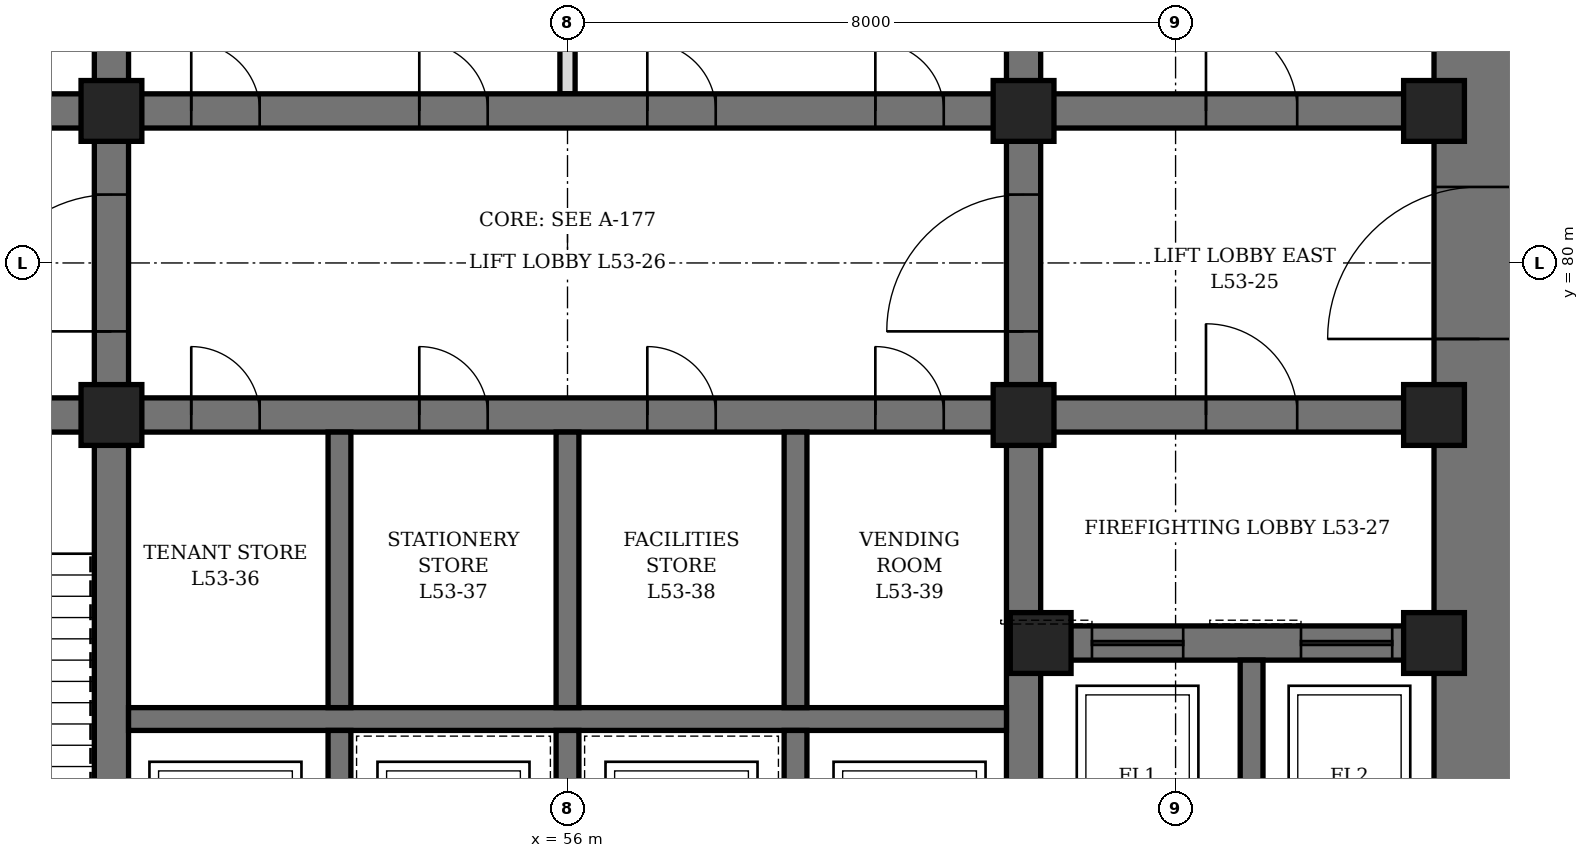
"""IFC4 building model, lengths in metres.
Left out: names, types, materials, properties, quantities, classifications, styles, units other than length and angle.
Written with IfcOpenShell. Run it as: python <this file> out.ifc"""

import sys

from ifc_helpers import new_model, si_unit, direction, frame, frame_2d, origin, origin_2d, place, context, subcontext, project, spatial, rectangle, hollow_rectangle, extrude, element, fill, save


model = new_model("IFC4")
c1 = context("Model", 3, precision=1e-05, world=origin(), true_north=direction((0.0, 1.0)))
c2 = subcontext(c1, "Body", "Model", "MODEL_VIEW")
j1 = project(units=[si_unit("LENGTHUNIT", "METRE"), si_unit("PLANEANGLEUNIT", "RADIAN")], contexts=[c1])
p1 = place(None, origin())
s1 = spatial("IfcSite", under=j1, at=p1, CompositionType="ELEMENT")
p2 = place(p1, origin())
s2 = spatial("IfcBuilding", under=s1, at=p2, CompositionType="ELEMENT")
p3 = place(p2, frame((0.0, 0.0, 235.9)))
s3 = spatial("IfcBuildingStorey", under=s2, at=p3, CompositionType="ELEMENT", Elevation=235.9)
p4 = place(p3, frame((68.0, 70.4, 0.0), z_axis=(0.0, 0.0, 1.0), x_axis=(0.0, 1.0, 0.0)))
e1 = element("IfcWall", 1, at=p4, inside=s3, PredefinedType="SHEAR", context=c2, shape_type="SweptSolid", body=[
    extrude(rectangle(XDim=19.2, YDim=1.2, at=frame_2d((9.6, 0.0))), origin(), (0.0, 0.0, 1.0), 4.2),
])
p5 = place(p4, frame((8.6, 0.0, 0.0)))
e2 = element("IfcOpeningElement", 2, at=p5, cuts=e1, PredefinedType="OPENING", context=c2, shape_type="SweptSolid", body=[
    extrude(rectangle(XDim=2.0, YDim=2.4, at=frame_2d((1.0, 1.2))), frame((0.0, 0.61, 0.0), z_axis=(0.0, -1.0, 0.0), x_axis=(1.0, 0.0, 0.0)), (0.0, 0.0, 1.0), 1.22),
])
p6 = place(p3, frame((50.0, 71.6, 0.0), z_axis=(0.0, 0.0, 1.0), x_axis=(0.0, 1.0, 0.0)))
e3 = element("IfcWall", 3, at=p6, inside=s3, PredefinedType="SHEAR", context=c2, shape_type="SweptSolid", body=[
    extrude(rectangle(XDim=16.8, YDim=0.45, at=frame_2d((8.4, 0.0))), origin(), (0.0, 0.0, 1.0), 4.2),
])
p7 = place(p6, frame((7.5, 0.0, 0.0)))
e4 = element("IfcOpeningElement", 4, at=p7, cuts=e3, PredefinedType="OPENING", context=c2, shape_type="SweptSolid", body=[
    extrude(rectangle(XDim=1.8, YDim=2.4, at=frame_2d((0.9, 1.2))), frame((0.0, 0.235, 0.0), z_axis=(0.0, -1.0, 0.0), x_axis=(1.0, 0.0, 0.0)), (0.0, 0.0, 1.0), 0.47),
])
p8 = place(p3, frame((62.0, 71.6, 0.0), z_axis=(0.0, 0.0, 1.0), x_axis=(0.0, 1.0, 0.0)))
e5 = element("IfcWall", 5, at=p8, inside=s3, PredefinedType="SHEAR", context=c2, shape_type="SweptSolid", body=[
    extrude(rectangle(XDim=16.8, YDim=0.45, at=frame_2d((8.4, 0.0))), origin(), (0.0, 0.0, 1.0), 4.2),
])
p9 = place(p8, frame((7.5, 0.0, 0.0)))
e6 = element("IfcOpeningElement", 6, at=p9, cuts=e5, PredefinedType="OPENING", context=c2, shape_type="SweptSolid", body=[
    extrude(rectangle(XDim=1.8, YDim=2.4, at=frame_2d((0.9, 1.2))), frame((0.0, 0.235, 0.0), z_axis=(0.0, -1.0, 0.0), x_axis=(1.0, 0.0, 0.0)), (0.0, 0.0, 1.0), 0.47),
])
p10 = place(p3, frame((44.6, 78.0, 0.0), z_axis=(0.0, 0.0, 1.0), x_axis=(1.0, 0.0, 0.0)))
e7 = element("IfcWall", 7, at=p10, inside=s3, PredefinedType="SHEAR", context=c2, shape_type="SweptSolid", body=[
    extrude(rectangle(XDim=5.175, YDim=0.45, at=frame_2d((2.587, 0.0))), origin(), (0.0, 0.0, 1.0), 4.2),
])
p11 = place(p10, frame((1.8, 0.0, 0.0)))
e8 = element("IfcOpeningElement", 8, at=p11, cuts=e7, PredefinedType="OPENING", context=c2, shape_type="SweptSolid", body=[
    extrude(rectangle(XDim=1.2, YDim=2.1, at=frame_2d((0.6, 1.05))), frame((0.0, 0.235, 0.0), z_axis=(0.0, -1.0, 0.0), x_axis=(1.0, 0.0, 0.0)), (0.0, 0.0, 1.0), 0.47),
])
p12 = place(p3, frame((44.6, 82.0, 0.0), z_axis=(0.0, 0.0, 1.0), x_axis=(1.0, 0.0, 0.0)))
e9 = element("IfcWall", 9, at=p12, inside=s3, PredefinedType="SHEAR", context=c2, shape_type="SweptSolid", body=[
    extrude(rectangle(XDim=5.175, YDim=0.45, at=frame_2d((2.587, 0.0))), origin(), (0.0, 0.0, 1.0), 4.2),
])
p13 = place(p12, frame((0.7, 0.0, 0.0)))
e10 = element("IfcOpeningElement", 10, at=p13, cuts=e9, PredefinedType="OPENING", context=c2, shape_type="SweptSolid", body=[
    extrude(rectangle(XDim=0.9, YDim=2.1, at=frame_2d((0.45, 1.05))), frame((0.0, 0.235, 0.0), z_axis=(0.0, -1.0, 0.0), x_axis=(1.0, 0.0, 0.0)), (0.0, 0.0, 1.0), 0.47),
])
p14 = place(p3, frame((62.225, 75.0, 0.0), z_axis=(0.0, 0.0, 1.0), x_axis=(1.0, 0.0, 0.0)))
e11 = element("IfcWall", 11, at=p14, inside=s3, PredefinedType="SHEAR", context=c2, shape_type="SweptSolid", body=[
    extrude(rectangle(XDim=5.175, YDim=0.45, at=frame_2d((2.587, 0.0))), origin(), (0.0, 0.0, 1.0), 4.2),
])
p15 = place(p14, frame((0.675, 0.0, 0.0)))
e12 = element("IfcOpeningElement", 12, at=p15, cuts=e11, PredefinedType="OPENING", context=c2, shape_type="SweptSolid", body=[
    extrude(rectangle(XDim=1.2, YDim=2.2, at=frame_2d((0.6, 1.1))), frame((0.0, 0.235, 0.0), z_axis=(0.0, -1.0, 0.0), x_axis=(1.0, 0.0, 0.0)), (0.0, 0.0, 1.0), 0.47),
])
p16 = place(p14, frame((3.425, 0.0, 0.0)))
e13 = element("IfcOpeningElement", 13, at=p16, cuts=e11, PredefinedType="OPENING", context=c2, shape_type="SweptSolid", body=[
    extrude(rectangle(XDim=1.2, YDim=2.2, at=frame_2d((0.6, 1.1))), frame((0.0, 0.235, 0.0), z_axis=(0.0, -1.0, 0.0), x_axis=(1.0, 0.0, 0.0)), (0.0, 0.0, 1.0), 0.47),
])
p17 = place(p3, frame((62.225, 78.0, 0.0), z_axis=(0.0, 0.0, 1.0), x_axis=(1.0, 0.0, 0.0)))
e14 = element("IfcWall", 14, at=p17, inside=s3, PredefinedType="SHEAR", context=c2, shape_type="SweptSolid", body=[
    extrude(rectangle(XDim=5.175, YDim=0.45, at=frame_2d((2.587, 0.0))), origin(), (0.0, 0.0, 1.0), 4.2),
])
p18 = place(p17, frame((2.175, 0.0, 0.0)))
e15 = element("IfcOpeningElement", 15, at=p18, cuts=e14, PredefinedType="OPENING", context=c2, shape_type="SweptSolid", body=[
    extrude(rectangle(XDim=1.2, YDim=2.1, at=frame_2d((0.6, 1.05))), frame((0.0, 0.235, 0.0), z_axis=(0.0, -1.0, 0.0), x_axis=(1.0, 0.0, 0.0)), (0.0, 0.0, 1.0), 0.47),
])
p19 = place(p3, frame((62.225, 82.0, 0.0), z_axis=(0.0, 0.0, 1.0), x_axis=(1.0, 0.0, 0.0)))
e16 = element("IfcWall", 16, at=p19, inside=s3, PredefinedType="SHEAR", context=c2, shape_type="SweptSolid", body=[
    extrude(rectangle(XDim=5.175, YDim=0.45, at=frame_2d((2.587, 0.0))), origin(), (0.0, 0.0, 1.0), 4.2),
])
p20 = place(p19, frame((2.175, 0.0, 0.0)))
e17 = element("IfcOpeningElement", 17, at=p20, cuts=e16, PredefinedType="OPENING", context=c2, shape_type="SweptSolid", body=[
    extrude(rectangle(XDim=1.2, YDim=2.1, at=frame_2d((0.6, 1.05))), frame((0.0, 0.235, 0.0), z_axis=(0.0, -1.0, 0.0), x_axis=(1.0, 0.0, 0.0)), (0.0, 0.0, 1.0), 0.47),
])
p21 = place(p3, frame((50.225, 78.0, 0.0), z_axis=(0.0, 0.0, 1.0), x_axis=(1.0, 0.0, 0.0)))
e18 = element("IfcWall", 18, at=p21, inside=s3, PredefinedType="SHEAR", context=c2, shape_type="SweptSolid", body=[
    extrude(rectangle(XDim=11.55, YDim=0.45, at=frame_2d((5.775, 0.0))), origin(), (0.0, 0.0, 1.0), 4.2),
])
p22 = place(p21, frame((0.825, 0.0, 0.0)))
e19 = element("IfcOpeningElement", 19, at=p22, cuts=e18, PredefinedType="OPENING", context=c2, shape_type="SweptSolid", body=[
    extrude(rectangle(XDim=0.9, YDim=2.1, at=frame_2d((0.45, 1.05))), frame((0.0, 0.235, 0.0), z_axis=(0.0, -1.0, 0.0), x_axis=(1.0, 0.0, 0.0)), (0.0, 0.0, 1.0), 0.47),
])
p23 = place(p21, frame((3.825, 0.0, 0.0)))
e20 = element("IfcOpeningElement", 20, at=p23, cuts=e18, PredefinedType="OPENING", context=c2, shape_type="SweptSolid", body=[
    extrude(rectangle(XDim=0.9, YDim=2.1, at=frame_2d((0.45, 1.05))), frame((0.0, 0.235, 0.0), z_axis=(0.0, -1.0, 0.0), x_axis=(1.0, 0.0, 0.0)), (0.0, 0.0, 1.0), 0.47),
])
p24 = place(p21, frame((6.825, 0.0, 0.0)))
e21 = element("IfcOpeningElement", 21, at=p24, cuts=e18, PredefinedType="OPENING", context=c2, shape_type="SweptSolid", body=[
    extrude(rectangle(XDim=0.9, YDim=2.1, at=frame_2d((0.45, 1.05))), frame((0.0, 0.235, 0.0), z_axis=(0.0, -1.0, 0.0), x_axis=(1.0, 0.0, 0.0)), (0.0, 0.0, 1.0), 0.47),
])
p25 = place(p21, frame((9.825, 0.0, 0.0)))
e22 = element("IfcOpeningElement", 22, at=p25, cuts=e18, PredefinedType="OPENING", context=c2, shape_type="SweptSolid", body=[
    extrude(rectangle(XDim=0.9, YDim=2.1, at=frame_2d((0.45, 1.05))), frame((0.0, 0.235, 0.0), z_axis=(0.0, -1.0, 0.0), x_axis=(1.0, 0.0, 0.0)), (0.0, 0.0, 1.0), 0.47),
])
p26 = place(p3, frame((50.225, 82.0, 0.0), z_axis=(0.0, 0.0, 1.0), x_axis=(1.0, 0.0, 0.0)))
e23 = element("IfcWall", 23, at=p26, inside=s3, PredefinedType="SHEAR", context=c2, shape_type="SweptSolid", body=[
    extrude(rectangle(XDim=11.55, YDim=0.45, at=frame_2d((5.775, 0.0))), origin(), (0.0, 0.0, 1.0), 4.2),
])
p27 = place(p26, frame((0.825, 0.0, 0.0)))
e24 = element("IfcOpeningElement", 24, at=p27, cuts=e23, PredefinedType="OPENING", context=c2, shape_type="SweptSolid", body=[
    extrude(rectangle(XDim=0.9, YDim=2.1, at=frame_2d((0.45, 1.05))), frame((0.0, 0.235, 0.0), z_axis=(0.0, -1.0, 0.0), x_axis=(1.0, 0.0, 0.0)), (0.0, 0.0, 1.0), 0.47),
])
p28 = place(p26, frame((3.825, 0.0, 0.0)))
e25 = element("IfcOpeningElement", 25, at=p28, cuts=e23, PredefinedType="OPENING", context=c2, shape_type="SweptSolid", body=[
    extrude(rectangle(XDim=0.9, YDim=2.1, at=frame_2d((0.45, 1.05))), frame((0.0, 0.235, 0.0), z_axis=(0.0, -1.0, 0.0), x_axis=(1.0, 0.0, 0.0)), (0.0, 0.0, 1.0), 0.47),
])
p29 = place(p26, frame((6.825, 0.0, 0.0)))
e26 = element("IfcOpeningElement", 26, at=p29, cuts=e23, PredefinedType="OPENING", context=c2, shape_type="SweptSolid", body=[
    extrude(rectangle(XDim=0.9, YDim=2.1, at=frame_2d((0.45, 1.05))), frame((0.0, 0.235, 0.0), z_axis=(0.0, -1.0, 0.0), x_axis=(1.0, 0.0, 0.0)), (0.0, 0.0, 1.0), 0.47),
])
p30 = place(p26, frame((9.825, 0.0, 0.0)))
e27 = element("IfcOpeningElement", 27, at=p30, cuts=e23, PredefinedType="OPENING", context=c2, shape_type="SweptSolid", body=[
    extrude(rectangle(XDim=0.9, YDim=2.1, at=frame_2d((0.45, 1.05))), frame((0.0, 0.235, 0.0), z_axis=(0.0, -1.0, 0.0), x_axis=(1.0, 0.0, 0.0)), (0.0, 0.0, 1.0), 0.47),
])
p31 = place(p3, frame((50.225, 74.0, 0.0), z_axis=(0.0, 0.0, 1.0), x_axis=(1.0, 0.0, 0.0)))
e28 = element("IfcWall", 28, at=p31, inside=s3, PredefinedType="SHEAR", context=c2, shape_type="SweptSolid", body=[
    extrude(rectangle(XDim=11.55, YDim=0.3, at=frame_2d((5.775, 0.0))), origin(), (0.0, 0.0, 1.0), 4.2),
])
p32 = place(p3, frame((53.0, 71.6, 0.0), z_axis=(0.0, 0.0, 1.0), x_axis=(0.0, 1.0, 0.0)))
e29 = element("IfcWall", 29, at=p32, inside=s3, PredefinedType="SHEAR", context=c2, shape_type="SweptSolid", body=[
    extrude(rectangle(XDim=2.25, YDim=0.3, at=frame_2d((1.125, 0.0))), origin(), (0.0, 0.0, 1.0), 4.2),
])
p33 = place(p3, frame((53.0, 74.15, 0.0), z_axis=(0.0, 0.0, 1.0), x_axis=(0.0, 1.0, 0.0)))
e30 = element("IfcWall", 30, at=p33, inside=s3, PredefinedType="SHEAR", context=c2, shape_type="SweptSolid", body=[
    extrude(rectangle(XDim=3.625, YDim=0.3, at=frame_2d((1.812, 0.0))), origin(), (0.0, 0.0, 1.0), 4.2),
])
p34 = place(p3, frame((56.0, 71.6, 0.0), z_axis=(0.0, 0.0, 1.0), x_axis=(0.0, 1.0, 0.0)))
e31 = element("IfcWall", 31, at=p34, inside=s3, PredefinedType="SHEAR", context=c2, shape_type="SweptSolid", body=[
    extrude(rectangle(XDim=2.25, YDim=0.3, at=frame_2d((1.125, 0.0))), origin(), (0.0, 0.0, 1.0), 4.2),
])
p35 = place(p3, frame((56.0, 74.15, 0.0), z_axis=(0.0, 0.0, 1.0), x_axis=(0.0, 1.0, 0.0)))
e32 = element("IfcWall", 32, at=p35, inside=s3, PredefinedType="SHEAR", context=c2, shape_type="SweptSolid", body=[
    extrude(rectangle(XDim=3.625, YDim=0.3, at=frame_2d((1.812, 0.0))), origin(), (0.0, 0.0, 1.0), 4.2),
])
p36 = place(p3, frame((59.0, 71.6, 0.0), z_axis=(0.0, 0.0, 1.0), x_axis=(0.0, 1.0, 0.0)))
e33 = element("IfcWall", 33, at=p36, inside=s3, PredefinedType="SHEAR", context=c2, shape_type="SweptSolid", body=[
    extrude(rectangle(XDim=2.25, YDim=0.3, at=frame_2d((1.125, 0.0))), origin(), (0.0, 0.0, 1.0), 4.2),
])
p37 = place(p3, frame((59.0, 74.15, 0.0), z_axis=(0.0, 0.0, 1.0), x_axis=(0.0, 1.0, 0.0)))
e34 = element("IfcWall", 34, at=p37, inside=s3, PredefinedType="SHEAR", context=c2, shape_type="SweptSolid", body=[
    extrude(rectangle(XDim=3.625, YDim=0.3, at=frame_2d((1.812, 0.0))), origin(), (0.0, 0.0, 1.0), 4.2),
])
p38 = place(p3, frame((65.0, 71.6, 0.0), z_axis=(0.0, 0.0, 1.0), x_axis=(0.0, 1.0, 0.0)))
e35 = element("IfcWall", 35, at=p38, inside=s3, PredefinedType="SHEAR", context=c2, shape_type="SweptSolid", body=[
    extrude(rectangle(XDim=3.175, YDim=0.3, at=frame_2d((1.587, 0.0))), origin(), (0.0, 0.0, 1.0), 4.2),
])
for number, where, z_axis, x_axis in (
    (36, (50.0, 78.0, 0.0), (0.0, 0.0, 1.0), (1.0, 0.0, 0.0)),
    (37, (50.0, 82.0, 0.0), (0.0, 0.0, 1.0), (1.0, 0.0, 0.0)),
    (38, (62.0, 78.0, 0.0), (0.0, 0.0, 1.0), (1.0, 0.0, 0.0)),
    (39, (62.0, 82.0, 0.0), (0.0, 0.0, 1.0), (1.0, 0.0, 0.0)),
    (40, (62.225, 75.0, 0.0), (0.0, 0.0, 1.0), (1.0, 0.0, 0.0)),
    (41, (67.4, 75.0, 0.0), (0.0, 0.0, 1.0), (1.0, 0.0, 0.0)),
    (42, (67.4, 78.0, 0.0), (0.0, 0.0, 1.0), (1.0, 0.0, 0.0)),
    (43, (67.4, 82.0, 0.0), (0.0, 0.0, 1.0), (1.0, 0.0, 0.0)),
):
    element("IfcColumn", number, at=place(p3, frame(where, z_axis=z_axis, x_axis=x_axis)), inside=s3, PredefinedType="COLUMN", context=c2, shape_type="SweptSolid", body=[
        extrude(hollow_rectangle(XDim=0.8, YDim=0.8, WallThickness=0.1, at=origin_2d()), origin(), (0.0, 0.0, 1.0), 4.2),
    ])
p39 = place(p3, frame((56.0, 82.225, 0.0), z_axis=(0.0, 0.0, 1.0), x_axis=(0.0, 1.0, 0.0)))
e44 = element("IfcWall", 44, at=p39, inside=s3, PredefinedType="PARTITIONING", context=c2, shape_type="SweptSolid", body=[
    extrude(rectangle(XDim=3.55, YDim=0.2, at=frame_2d((1.775, 0.0))), origin(), (0.0, 0.0, 1.0), 3.14),
])
p40 = place(p22, origin())
e45 = element("IfcDoor", 45, at=p40, inside=s3, OperationType="SINGLE_SWING_LEFT", PredefinedType="DOOR", context=c2, shape_type="SweptSolid", body=[
    extrude(rectangle(XDim=0.9, YDim=2.1, at=frame_2d((0.45, 1.05))), frame((0.0, 0.225, 0.0), z_axis=(0.0, -1.0, 0.0), x_axis=(1.0, 0.0, 0.0)), (0.0, 0.0, 1.0), 0.449),
])
fill(e19, e45)
p41 = place(p23, origin())
e46 = element("IfcDoor", 46, at=p41, inside=s3, OperationType="SINGLE_SWING_LEFT", PredefinedType="DOOR", context=c2, shape_type="SweptSolid", body=[
    extrude(rectangle(XDim=0.9, YDim=2.1, at=frame_2d((0.45, 1.05))), frame((0.0, 0.225, 0.0), z_axis=(0.0, -1.0, 0.0), x_axis=(1.0, 0.0, 0.0)), (0.0, 0.0, 1.0), 0.449),
])
fill(e20, e46)
p42 = place(p24, origin())
e47 = element("IfcDoor", 47, at=p42, inside=s3, OperationType="SINGLE_SWING_LEFT", PredefinedType="DOOR", context=c2, shape_type="SweptSolid", body=[
    extrude(rectangle(XDim=0.9, YDim=2.1, at=frame_2d((0.45, 1.05))), frame((0.0, 0.225, 0.0), z_axis=(0.0, -1.0, 0.0), x_axis=(1.0, 0.0, 0.0)), (0.0, 0.0, 1.0), 0.449),
])
fill(e21, e47)
p43 = place(p25, origin())
e48 = element("IfcDoor", 48, at=p43, inside=s3, OperationType="SINGLE_SWING_LEFT", PredefinedType="DOOR", context=c2, shape_type="SweptSolid", body=[
    extrude(rectangle(XDim=0.9, YDim=2.1, at=frame_2d((0.45, 1.05))), frame((0.0, 0.225, 0.0), z_axis=(0.0, -1.0, 0.0), x_axis=(1.0, 0.0, 0.0)), (0.0, 0.0, 1.0), 0.449),
])
fill(e22, e48)
p44 = place(p27, origin())
e49 = element("IfcDoor", 49, at=p44, inside=s3, OperationType="SINGLE_SWING_LEFT", PredefinedType="DOOR", context=c2, shape_type="SweptSolid", body=[
    extrude(rectangle(XDim=0.9, YDim=2.1, at=frame_2d((0.45, 1.05))), frame((0.0, 0.225, 0.0), z_axis=(0.0, -1.0, 0.0), x_axis=(1.0, 0.0, 0.0)), (0.0, 0.0, 1.0), 0.449),
])
fill(e24, e49)
p45 = place(p28, origin())
e50 = element("IfcDoor", 50, at=p45, inside=s3, OperationType="SINGLE_SWING_LEFT", PredefinedType="DOOR", context=c2, shape_type="SweptSolid", body=[
    extrude(rectangle(XDim=0.9, YDim=2.1, at=frame_2d((0.45, 1.05))), frame((0.0, 0.225, 0.0), z_axis=(0.0, -1.0, 0.0), x_axis=(1.0, 0.0, 0.0)), (0.0, 0.0, 1.0), 0.449),
])
fill(e25, e50)
p46 = place(p29, origin())
e51 = element("IfcDoor", 51, at=p46, inside=s3, OperationType="SINGLE_SWING_LEFT", PredefinedType="DOOR", context=c2, shape_type="SweptSolid", body=[
    extrude(rectangle(XDim=0.9, YDim=2.1, at=frame_2d((0.45, 1.05))), frame((0.0, 0.225, 0.0), z_axis=(0.0, -1.0, 0.0), x_axis=(1.0, 0.0, 0.0)), (0.0, 0.0, 1.0), 0.449),
])
fill(e26, e51)
p47 = place(p30, origin())
e52 = element("IfcDoor", 52, at=p47, inside=s3, OperationType="SINGLE_SWING_LEFT", PredefinedType="DOOR", context=c2, shape_type="SweptSolid", body=[
    extrude(rectangle(XDim=0.9, YDim=2.1, at=frame_2d((0.45, 1.05))), frame((0.0, 0.225, 0.0), z_axis=(0.0, -1.0, 0.0), x_axis=(1.0, 0.0, 0.0)), (0.0, 0.0, 1.0), 0.449),
])
fill(e27, e52)
p48 = place(p20, origin())
e53 = element("IfcDoor", 53, at=p48, inside=s3, OperationType="SINGLE_SWING_LEFT", PredefinedType="DOOR", context=c2, shape_type="SweptSolid", body=[
    extrude(rectangle(XDim=1.2, YDim=2.1, at=frame_2d((0.6, 1.05))), frame((0.0, 0.225, 0.0), z_axis=(0.0, -1.0, 0.0), x_axis=(1.0, 0.0, 0.0)), (0.0, 0.0, 1.0), 0.449),
])
fill(e17, e53)
p49 = place(p5, origin())
e54 = element("IfcDoor", 54, at=p49, inside=s3, OperationType="DOUBLE_DOOR_SINGLE_SWING", PredefinedType="DOOR", context=c2, shape_type="SweptSolid", body=[
    extrude(rectangle(XDim=2.0, YDim=2.4, at=frame_2d((1.0, 1.2))), frame((0.0, 0.35, 0.0), z_axis=(0.0, -1.0, 0.0), x_axis=(1.0, 0.0, 0.0)), (0.0, 0.0, 1.0), 0.7),
])
fill(e2, e54)
p50 = place(p7, origin())
e55 = element("IfcDoor", 55, at=p50, inside=s3, OperationType="DOUBLE_DOOR_SINGLE_SWING", PredefinedType="DOOR", context=c2, shape_type="SweptSolid", body=[
    extrude(rectangle(XDim=1.8, YDim=2.4, at=frame_2d((0.9, 1.2))), frame((0.0, 0.225, 0.0), z_axis=(0.0, -1.0, 0.0), x_axis=(1.0, 0.0, 0.0)), (0.0, 0.0, 1.0), 0.449),
])
fill(e4, e55)
p51 = place(p9, origin())
e56 = element("IfcDoor", 56, at=p51, inside=s3, OperationType="DOUBLE_DOOR_SINGLE_SWING", PredefinedType="DOOR", context=c2, shape_type="SweptSolid", body=[
    extrude(rectangle(XDim=1.8, YDim=2.4, at=frame_2d((0.9, 1.2))), frame((0.0, 0.225, 0.0), z_axis=(0.0, -1.0, 0.0), x_axis=(1.0, 0.0, 0.0)), (0.0, 0.0, 1.0), 0.449),
])
fill(e6, e56)
p52 = place(p18, origin())
e57 = element("IfcDoor", 57, at=p52, inside=s3, OperationType="SINGLE_SWING_RIGHT", PredefinedType="DOOR", context=c2, shape_type="SweptSolid", body=[
    extrude(rectangle(XDim=1.2, YDim=2.1, at=frame_2d((0.6, 1.05))), frame((0.0, 0.225, 0.0), z_axis=(0.0, -1.0, 0.0), x_axis=(1.0, 0.0, 0.0)), (0.0, 0.0, 1.0), 0.449),
])
fill(e15, e57)
p53 = place(p15, origin())
e58 = element("IfcDoor", 58, at=p53, inside=s3, OperationType="SLIDING_TO_LEFT", PredefinedType="DOOR", context=c2, shape_type="SweptSolid", body=[
    extrude(rectangle(XDim=1.2, YDim=2.2, at=frame_2d((0.6, 1.1))), frame((0.0, 0.225, 0.0), z_axis=(0.0, -1.0, 0.0), x_axis=(1.0, 0.0, 0.0)), (0.0, 0.0, 1.0), 0.449),
])
fill(e12, e58)
p54 = place(p16, origin())
e59 = element("IfcDoor", 59, at=p54, inside=s3, OperationType="SLIDING_TO_LEFT", PredefinedType="DOOR", context=c2, shape_type="SweptSolid", body=[
    extrude(rectangle(XDim=1.2, YDim=2.2, at=frame_2d((0.6, 1.1))), frame((0.0, 0.225, 0.0), z_axis=(0.0, -1.0, 0.0), x_axis=(1.0, 0.0, 0.0)), (0.0, 0.0, 1.0), 0.449),
])
fill(e13, e59)
save(model, sys.argv[1])
